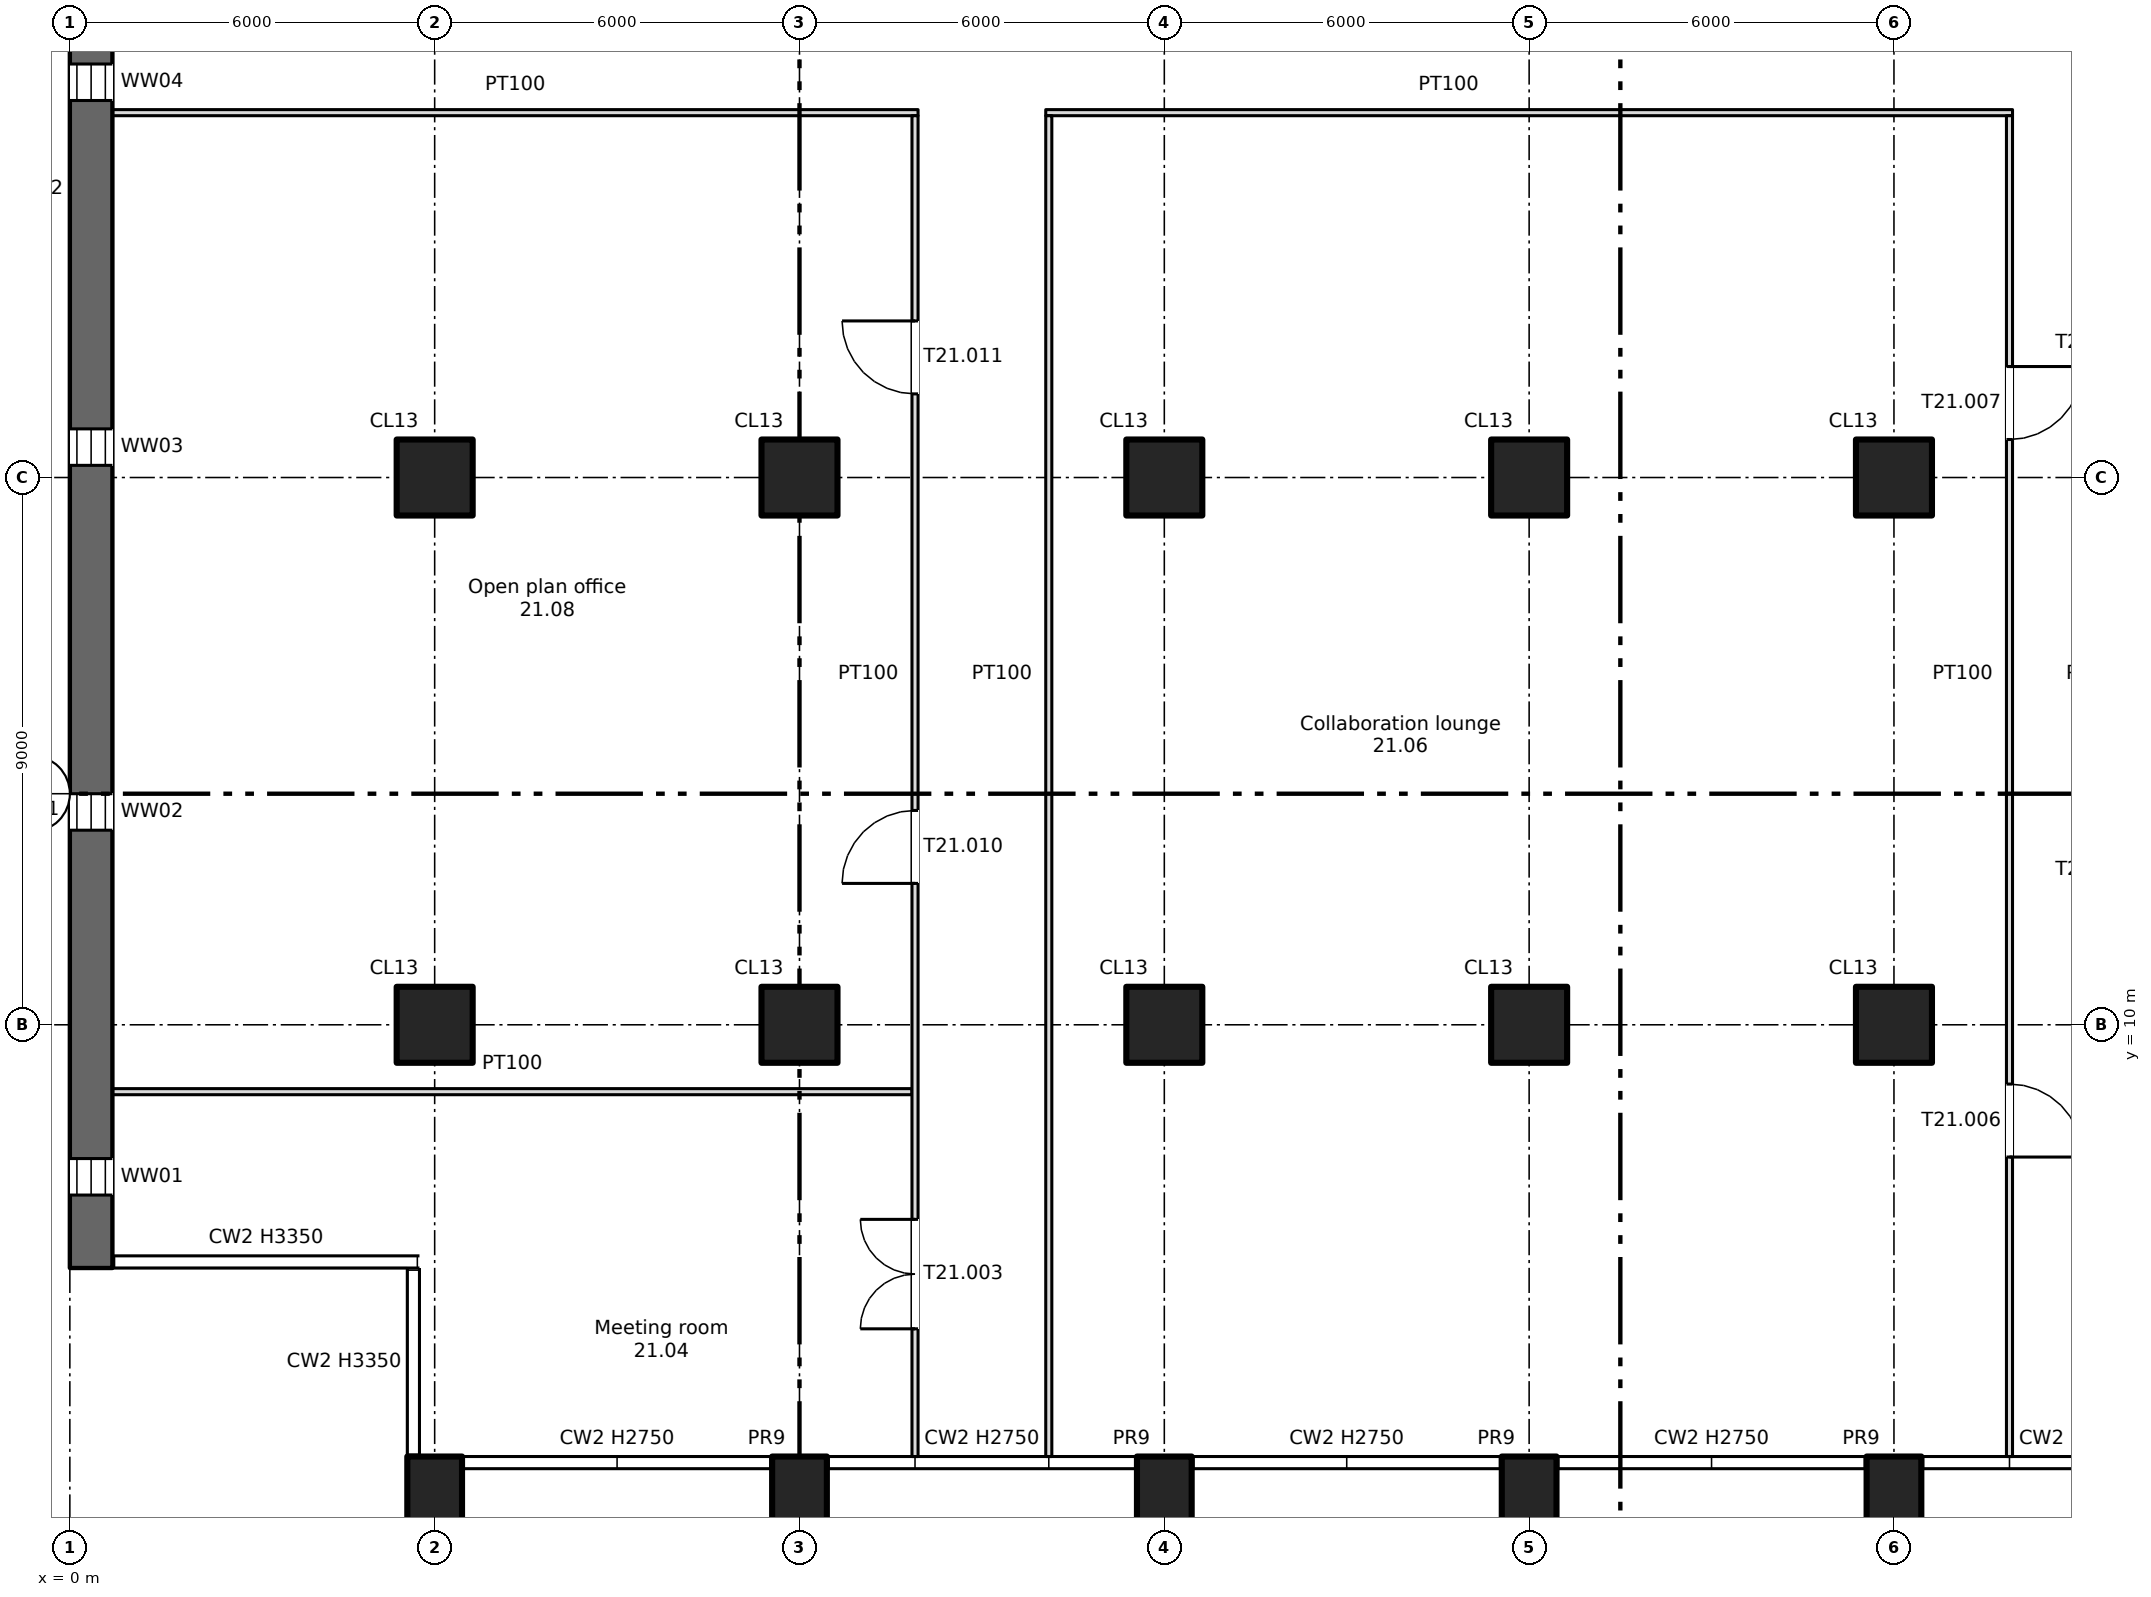
"""IFC4 building model, lengths in metres.
Left out: names, types, materials, properties, quantities, classifications, styles, units other than length and angle.
Written with IfcOpenShell. Run it as: python <this file> out.ifc"""

import sys

from ifc_helpers import new_model, si_unit, direction, frame, frame_2d, origin, origin_2d, place, context, subcontext, project, spatial, rectangle, extrude, element, fill, save


model = new_model("IFC4")
c1 = context("Model", 3, precision=1e-05, world=origin(), true_north=direction((0.0, 1.0)))
c2 = subcontext(c1, "Body", "Model", "MODEL_VIEW")
j1 = project(units=[si_unit("LENGTHUNIT", "METRE"), si_unit("PLANEANGLEUNIT", "RADIAN")], contexts=[c1])
p1 = place(None, origin())
s1 = spatial("IfcSite", under=j1, at=p1, CompositionType="ELEMENT")
p2 = place(p1, origin())
s2 = spatial("IfcBuilding", under=s1, at=p2, CompositionType="ELEMENT")
p3 = place(p2, frame((0.0, 0.0, 136.25)))
s3 = spatial("IfcBuildingStorey", under=s2, at=p3, CompositionType="ELEMENT", Elevation=136.25)
for number, where, z_axis, x_axis in (
    (1, (6.0, 2.2, -0.4), (0.0, 0.0, 1.0), (1.0, 0.0, 0.0)),
    (2, (12.0, 2.2, -0.4), (0.0, 0.0, 1.0), (1.0, 0.0, 0.0)),
    (3, (18.0, 2.2, -0.4), (0.0, 0.0, 1.0), (1.0, 0.0, 0.0)),
    (4, (24.0, 2.2, -0.4), (0.0, 0.0, 1.0), (1.0, 0.0, 0.0)),
    (5, (30.0, 2.2, -0.4), (0.0, 0.0, 1.0), (1.0, 0.0, 0.0)),
):
    element("IfcColumn", number, at=place(p3, frame(where, z_axis=z_axis, x_axis=x_axis)), inside=s3, PredefinedType="COLUMN", context=c2, shape_type="SweptSolid", body=[
        extrude(rectangle(XDim=0.9, YDim=1.4, at=origin_2d()), origin(), (0.0, 0.0, 1.0), 3.75),
    ])
for number, where, z_axis, x_axis in (
    (6, (6.0, 10.0, 0.0), (0.0, 0.0, 1.0), (1.0, 0.0, 0.0)),
    (7, (6.0, 19.0, 0.0), (0.0, 0.0, 1.0), (1.0, 0.0, 0.0)),
    (8, (12.0, 10.0, 0.0), (0.0, 0.0, 1.0), (1.0, 0.0, 0.0)),
    (9, (12.0, 19.0, 0.0), (0.0, 0.0, 1.0), (1.0, 0.0, 0.0)),
    (10, (18.0, 10.0, 0.0), (0.0, 0.0, 1.0), (1.0, 0.0, 0.0)),
    (11, (18.0, 19.0, 0.0), (0.0, 0.0, 1.0), (1.0, 0.0, 0.0)),
    (12, (24.0, 10.0, 0.0), (0.0, 0.0, 1.0), (1.0, 0.0, 0.0)),
    (13, (24.0, 19.0, 0.0), (0.0, 0.0, 1.0), (1.0, 0.0, 0.0)),
    (14, (30.0, 10.0, 0.0), (0.0, 0.0, 1.0), (1.0, 0.0, 0.0)),
    (15, (30.0, 19.0, 0.0), (0.0, 0.0, 1.0), (1.0, 0.0, 0.0)),
):
    element("IfcColumn", number, at=place(p3, frame(where, z_axis=z_axis, x_axis=x_axis)), inside=s3, PredefinedType="COLUMN", context=c2, shape_type="SweptSolid", body=[
        extrude(rectangle(XDim=1.25, YDim=1.25, at=origin_2d()), origin(), (0.0, 0.0, 1.0), 3.35),
    ])
p4 = place(p3, frame((0.35, 6.0, 0.0), z_axis=(0.0, 0.0, 1.0), x_axis=(0.0, 1.0, 0.0)))
e16 = element("IfcWall", 16, at=p4, inside=s3, PredefinedType="SHEAR", context=c2, shape_type="SweptSolid", body=[
    extrude(rectangle(XDim=35.5, YDim=0.7, at=frame_2d((17.75, 0.0))), origin(), (0.0, 0.0, 1.0), 3.35),
])
p5 = place(p4, frame((1.2, 0.0, 0.6)))
e17 = element("IfcOpeningElement", 17, at=p5, cuts=e16, PredefinedType="OPENING", context=c2, shape_type="SweptSolid", body=[
    extrude(rectangle(XDim=0.6, YDim=2.4, at=frame_2d((0.3, 1.2))), frame((0.0, 0.36, 0.0), z_axis=(0.0, -1.0, 0.0), x_axis=(1.0, 0.0, 0.0)), (0.0, 0.0, 1.0), 0.72),
])
p6 = place(p4, frame((7.2, 0.0, 0.6)))
e18 = element("IfcOpeningElement", 18, at=p6, cuts=e16, PredefinedType="OPENING", context=c2, shape_type="SweptSolid", body=[
    extrude(rectangle(XDim=0.6, YDim=2.4, at=frame_2d((0.3, 1.2))), frame((0.0, 0.36, 0.0), z_axis=(0.0, -1.0, 0.0), x_axis=(1.0, 0.0, 0.0)), (0.0, 0.0, 1.0), 0.72),
])
p7 = place(p4, frame((13.2, 0.0, 0.6)))
e19 = element("IfcOpeningElement", 19, at=p7, cuts=e16, PredefinedType="OPENING", context=c2, shape_type="SweptSolid", body=[
    extrude(rectangle(XDim=0.6, YDim=2.4, at=frame_2d((0.3, 1.2))), frame((0.0, 0.36, 0.0), z_axis=(0.0, -1.0, 0.0), x_axis=(1.0, 0.0, 0.0)), (0.0, 0.0, 1.0), 0.72),
])
p8 = place(p4, frame((19.2, 0.0, 0.6)))
e20 = element("IfcOpeningElement", 20, at=p8, cuts=e16, PredefinedType="OPENING", context=c2, shape_type="SweptSolid", body=[
    extrude(rectangle(XDim=0.6, YDim=2.4, at=frame_2d((0.3, 1.2))), frame((0.0, 0.36, 0.0), z_axis=(0.0, -1.0, 0.0), x_axis=(1.0, 0.0, 0.0)), (0.0, 0.0, 1.0), 0.72),
])
p9 = place(p4, frame((25.2, 0.0, 0.6)))
e21 = element("IfcOpeningElement", 21, at=p9, cuts=e16, PredefinedType="OPENING", context=c2, shape_type="SweptSolid", body=[
    extrude(rectangle(XDim=0.6, YDim=2.4, at=frame_2d((0.3, 1.2))), frame((0.0, 0.36, 0.0), z_axis=(0.0, -1.0, 0.0), x_axis=(1.0, 0.0, 0.0)), (0.0, 0.0, 1.0), 0.72),
])
p10 = place(p4, frame((31.2, 0.0, 0.6)))
e22 = element("IfcOpeningElement", 22, at=p10, cuts=e16, PredefinedType="OPENING", context=c2, shape_type="SweptSolid", body=[
    extrude(rectangle(XDim=0.6, YDim=2.4, at=frame_2d((0.3, 1.2))), frame((0.0, 0.36, 0.0), z_axis=(0.0, -1.0, 0.0), x_axis=(1.0, 0.0, 0.0)), (0.0, 0.0, 1.0), 0.72),
])
p11 = place(p3, frame((0.7, 8.9, 0.0), z_axis=(0.0, 0.0, 1.0), x_axis=(1.0, 0.0, 0.0)))
e23 = element("IfcWall", 23, at=p11, inside=s3, PredefinedType="PARTITIONING", context=c2, shape_type="SweptSolid", body=[
    extrude(rectangle(XDim=13.15, YDim=0.1, at=frame_2d((6.575, 0.0))), origin(), (0.0, 0.0, 1.0), 3.35),
])
p12 = place(p3, frame((0.7, 25.0, 0.0), z_axis=(0.0, 0.0, 1.0), x_axis=(1.0, 0.0, 0.0)))
e24 = element("IfcWall", 24, at=p12, inside=s3, PredefinedType="PARTITIONING", context=c2, shape_type="SweptSolid", body=[
    extrude(rectangle(XDim=13.25, YDim=0.1, at=frame_2d((6.625, 0.0))), origin(), (0.0, 0.0, 1.0), 3.35),
])
p13 = place(p3, frame((16.05, 25.0, 0.0), z_axis=(0.0, 0.0, 1.0), x_axis=(1.0, 0.0, 0.0)))
e25 = element("IfcWall", 25, at=p13, inside=s3, PredefinedType="PARTITIONING", context=c2, shape_type="SweptSolid", body=[
    extrude(rectangle(XDim=15.9, YDim=0.1, at=frame_2d((7.95, 0.0))), origin(), (0.0, 0.0, 1.0), 3.35),
])
p14 = place(p3, frame((13.9, 2.9, 0.0), z_axis=(0.0, 0.0, 1.0), x_axis=(0.0, 1.0, 0.0)))
e26 = element("IfcWall", 26, at=p14, inside=s3, PredefinedType="PARTITIONING", context=c2, shape_type="SweptSolid", body=[
    extrude(rectangle(XDim=22.05, YDim=0.1, at=frame_2d((11.025, 0.0))), origin(), (0.0, 0.0, 1.0), 3.35),
])
p15 = place(p14, frame((2.1, 0.0, 0.0)))
e27 = element("IfcOpeningElement", 27, at=p15, cuts=e26, PredefinedType="OPENING", context=c2, shape_type="SweptSolid", body=[
    extrude(rectangle(XDim=1.8, YDim=2.1, at=frame_2d((0.9, 1.05))), frame((0.0, 0.06, 0.0), z_axis=(0.0, -1.0, 0.0), x_axis=(1.0, 0.0, 0.0)), (0.0, 0.0, 1.0), 0.12),
])
p16 = place(p14, frame((9.425, 0.0, 0.0)))
e28 = element("IfcOpeningElement", 28, at=p16, cuts=e26, PredefinedType="OPENING", context=c2, shape_type="SweptSolid", body=[
    extrude(rectangle(XDim=1.2, YDim=2.1, at=frame_2d((0.6, 1.05))), frame((0.0, 0.06, 0.0), z_axis=(0.0, -1.0, 0.0), x_axis=(1.0, 0.0, 0.0)), (0.0, 0.0, 1.0), 0.12),
])
p17 = place(p14, frame((17.475, 0.0, 0.0)))
e29 = element("IfcOpeningElement", 29, at=p17, cuts=e26, PredefinedType="OPENING", context=c2, shape_type="SweptSolid", body=[
    extrude(rectangle(XDim=1.2, YDim=2.1, at=frame_2d((0.6, 1.05))), frame((0.0, 0.06, 0.0), z_axis=(0.0, -1.0, 0.0), x_axis=(1.0, 0.0, 0.0)), (0.0, 0.0, 1.0), 0.12),
])
p18 = place(p3, frame((16.1, 2.9, 0.0), z_axis=(0.0, 0.0, 1.0), x_axis=(0.0, 1.0, 0.0)))
e30 = element("IfcWall", 30, at=p18, inside=s3, PredefinedType="PARTITIONING", context=c2, shape_type="SweptSolid", body=[
    extrude(rectangle(XDim=22.05, YDim=0.1, at=frame_2d((11.025, 0.0))), origin(), (0.0, 0.0, 1.0), 3.35),
])
p19 = place(p3, frame((31.9, 2.9, 0.0), z_axis=(0.0, 0.0, 1.0), x_axis=(0.0, 1.0, 0.0)))
e31 = element("IfcWall", 31, at=p19, inside=s3, PredefinedType="PARTITIONING", context=c2, shape_type="SweptSolid", body=[
    extrude(rectangle(XDim=22.05, YDim=0.1, at=frame_2d((11.025, 0.0))), origin(), (0.0, 0.0, 1.0), 3.35),
])
p20 = place(p19, frame((4.925, 0.0, 0.0)))
e32 = element("IfcOpeningElement", 32, at=p20, cuts=e31, PredefinedType="OPENING", context=c2, shape_type="SweptSolid", body=[
    extrude(rectangle(XDim=1.2, YDim=2.1, at=frame_2d((0.6, 1.05))), frame((0.0, 0.06, 0.0), z_axis=(0.0, -1.0, 0.0), x_axis=(1.0, 0.0, 0.0)), (0.0, 0.0, 1.0), 0.12),
])
p21 = place(p19, frame((16.725, 0.0, 0.0)))
e33 = element("IfcOpeningElement", 33, at=p21, cuts=e31, PredefinedType="OPENING", context=c2, shape_type="SweptSolid", body=[
    extrude(rectangle(XDim=1.2, YDim=2.1, at=frame_2d((0.6, 1.05))), frame((0.0, 0.06, 0.0), z_axis=(0.0, -1.0, 0.0), x_axis=(1.0, 0.0, 0.0)), (0.0, 0.0, 1.0), 0.12),
])
p22 = place(p5, origin())
e34 = element("IfcWindow", 34, at=p22, inside=s3, PartitioningType="SINGLE_PANEL", PredefinedType="WINDOW", context=c2, shape_type="SweptSolid", body=[
    extrude(rectangle(XDim=0.6, YDim=2.4, at=frame_2d((0.3, 1.2))), frame((0.0, 0.03, 0.0), z_axis=(0.0, -1.0, 0.0), x_axis=(1.0, 0.0, 0.0)), (0.0, 0.0, 1.0), 0.06),
])
fill(e17, e34)
p23 = place(p6, origin())
e35 = element("IfcWindow", 35, at=p23, inside=s3, PartitioningType="SINGLE_PANEL", PredefinedType="WINDOW", context=c2, shape_type="SweptSolid", body=[
    extrude(rectangle(XDim=0.6, YDim=2.4, at=frame_2d((0.3, 1.2))), frame((0.0, 0.03, 0.0), z_axis=(0.0, -1.0, 0.0), x_axis=(1.0, 0.0, 0.0)), (0.0, 0.0, 1.0), 0.06),
])
fill(e18, e35)
p24 = place(p7, origin())
e36 = element("IfcWindow", 36, at=p24, inside=s3, PartitioningType="SINGLE_PANEL", PredefinedType="WINDOW", context=c2, shape_type="SweptSolid", body=[
    extrude(rectangle(XDim=0.6, YDim=2.4, at=frame_2d((0.3, 1.2))), frame((0.0, 0.03, 0.0), z_axis=(0.0, -1.0, 0.0), x_axis=(1.0, 0.0, 0.0)), (0.0, 0.0, 1.0), 0.06),
])
fill(e19, e36)
p25 = place(p8, origin())
e37 = element("IfcWindow", 37, at=p25, inside=s3, PartitioningType="SINGLE_PANEL", PredefinedType="WINDOW", context=c2, shape_type="SweptSolid", body=[
    extrude(rectangle(XDim=0.6, YDim=2.4, at=frame_2d((0.3, 1.2))), frame((0.0, 0.03, 0.0), z_axis=(0.0, -1.0, 0.0), x_axis=(1.0, 0.0, 0.0)), (0.0, 0.0, 1.0), 0.06),
])
fill(e20, e37)
p26 = place(p15, origin())
e38 = element("IfcDoor", 38, at=p26, inside=s3, OperationType="DOUBLE_DOOR_SINGLE_SWING", PredefinedType="DOOR", context=c2, shape_type="SweptSolid", body=[
    extrude(rectangle(XDim=1.8, YDim=2.1, at=frame_2d((0.9, 1.05))), frame((0.0, 0.025, 0.0), z_axis=(0.0, -1.0, 0.0), x_axis=(1.0, 0.0, 0.0)), (0.0, 0.0, 1.0), 0.05),
])
fill(e27, e38)
p27 = place(p20, origin())
e39 = element("IfcDoor", 39, at=p27, inside=s3, OperationType="SINGLE_SWING_LEFT", PredefinedType="DOOR", context=c2, shape_type="SweptSolid", body=[
    extrude(rectangle(XDim=1.2, YDim=2.1, at=frame_2d((0.6, 1.05))), frame((0.0, 0.025, 0.0), z_axis=(0.0, -1.0, 0.0), x_axis=(1.0, 0.0, 0.0)), (0.0, 0.0, 1.0), 0.05),
])
fill(e32, e39)
p28 = place(p21, origin())
e40 = element("IfcDoor", 40, at=p28, inside=s3, OperationType="SINGLE_SWING_RIGHT", PredefinedType="DOOR", context=c2, shape_type="SweptSolid", body=[
    extrude(rectangle(XDim=1.2, YDim=2.1, at=frame_2d((0.6, 1.05))), frame((0.0, 0.025, 0.0), z_axis=(0.0, -1.0, 0.0), x_axis=(1.0, 0.0, 0.0)), (0.0, 0.0, 1.0), 0.05),
])
fill(e33, e40)
p29 = place(p16, origin())
e41 = element("IfcDoor", 41, at=p29, inside=s3, OperationType="SINGLE_SWING_LEFT", PredefinedType="DOOR", context=c2, shape_type="SweptSolid", body=[
    extrude(rectangle(XDim=1.2, YDim=2.1, at=frame_2d((0.6, 1.05))), frame((0.0, 0.025, 0.0), z_axis=(0.0, -1.0, 0.0), x_axis=(1.0, 0.0, 0.0)), (0.0, 0.0, 1.0), 0.05),
])
fill(e28, e41)
p30 = place(p17, origin())
e42 = element("IfcDoor", 42, at=p30, inside=s3, OperationType="SINGLE_SWING_RIGHT", PredefinedType="DOOR", context=c2, shape_type="SweptSolid", body=[
    extrude(rectangle(XDim=1.2, YDim=2.1, at=frame_2d((0.6, 1.05))), frame((0.0, 0.025, 0.0), z_axis=(0.0, -1.0, 0.0), x_axis=(1.0, 0.0, 0.0)), (0.0, 0.0, 1.0), 0.05),
])
fill(e29, e42)
save(model, sys.argv[1])
